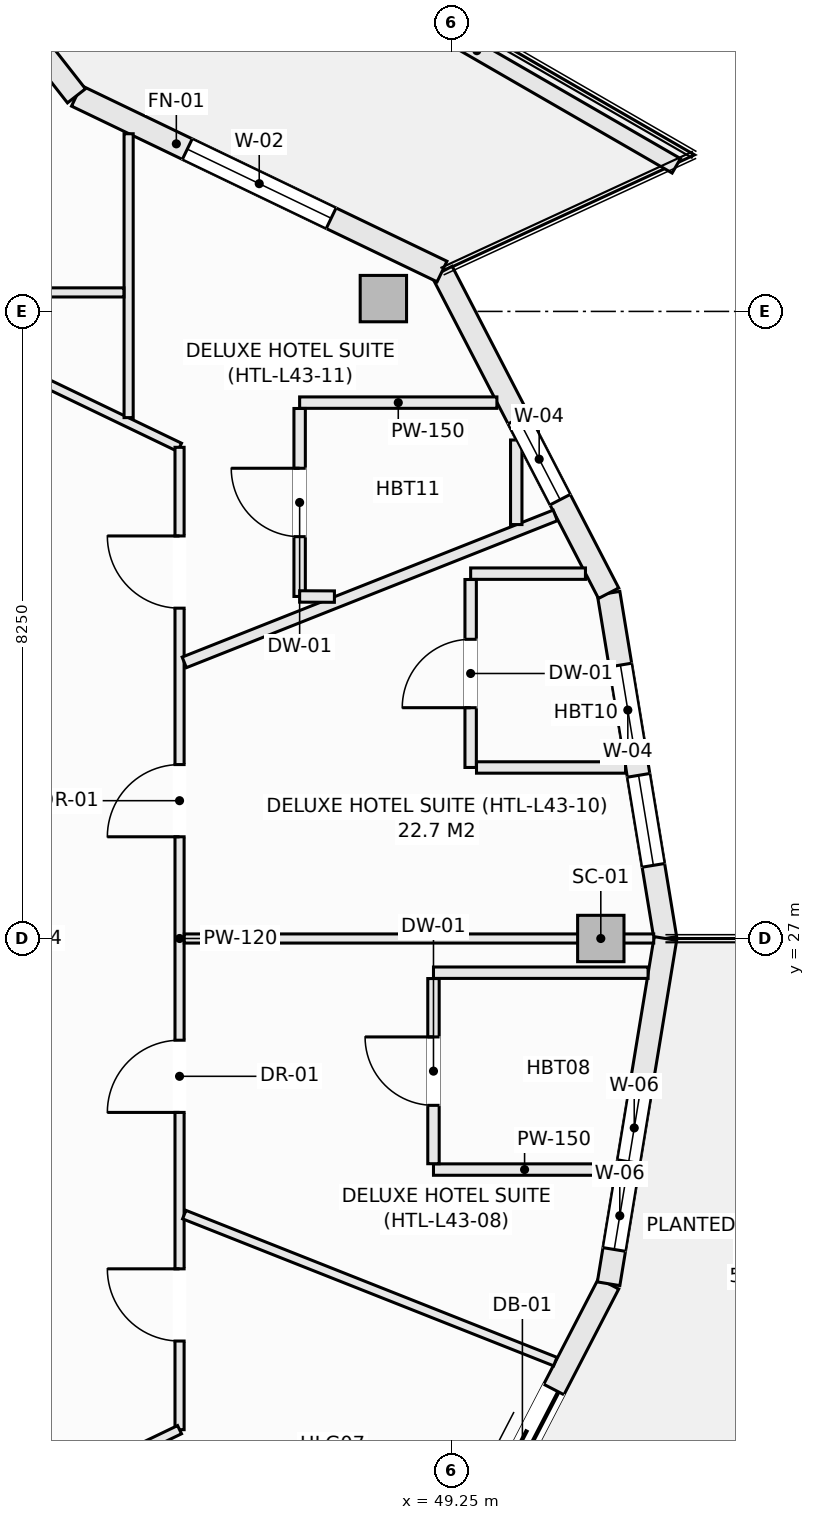
"""IFC4 building model, lengths in metres.
Left out: names, types, materials, properties, quantities, classifications, styles, units other than length and angle.
Written with IfcOpenShell. Run it as: python <this file> out.ifc"""

import sys

from ifc_helpers import new_model, si_unit, direction, frame, frame_2d, origin, origin_2d, place, context, subcontext, project, spatial, rectangle, hollow_rectangle, extrude, element, fill, save


model = new_model("IFC4")
c1 = context("Model", 3, precision=1e-05, world=origin(), true_north=direction((0.0, 1.0)))
c2 = subcontext(c1, "Body", "Model", "MODEL_VIEW")
j1 = project(units=[si_unit("LENGTHUNIT", "METRE"), si_unit("PLANEANGLEUNIT", "RADIAN")], contexts=[c1])
p1 = place(None, origin())
s1 = spatial("IfcSite", under=j1, at=p1, CompositionType="ELEMENT")
p2 = place(p1, origin())
s2 = spatial("IfcBuilding", under=s1, at=p2, CompositionType="ELEMENT")
p3 = place(p2, frame((0.0, 0.0, 166.5)))
s3 = spatial("IfcBuildingStorey", under=s2, at=p3, CompositionType="ELEMENT", Elevation=166.5)
for number, where, z_axis, x_axis in (
    (1, (51.212, 27.0, -0.27), (0.0, 0.0, 1.0), (1.0, 0.0, 0.0)),
    (2, (48.352, 35.419, -0.27), (0.0, 0.0, 1.0), (1.0, 0.0, 0.0)),
):
    element("IfcColumn", number, at=place(p3, frame(where, z_axis=z_axis, x_axis=x_axis)), inside=s3, PredefinedType="COLUMN", context=c2, shape_type="SweptSolid", body=[
        extrude(hollow_rectangle(XDim=0.61, YDim=0.61, WallThickness=0.025, at=origin_2d()), origin(), (0.0, 0.0, 1.0), 3.4),
    ])
p4 = place(p3, frame((51.315, 31.542, 0.0), z_axis=(0.0, 0.0, 1.0), x_axis=(0.162394765401, -0.986725868806, 0.0)))
e3 = element("IfcWall", 3, at=p4, inside=s3, PredefinedType="SOLIDWALL", context=c2, shape_type="SweptSolid", body=[
    extrude(rectangle(XDim=4.603, YDim=0.3, at=frame_2d((2.302, 0.0))), origin(), (0.0, 0.0, 1.0), 2.653),
])
p5 = place(p4, frame((0.958, 0.0, 0.74)))
e4 = element("IfcOpeningElement", 4, at=p5, cuts=e3, PredefinedType="OPENING", context=c2, shape_type="SweptSolid", body=[
    extrude(rectangle(XDim=1.2, YDim=1.7, at=frame_2d((0.6, 0.85))), frame((0.0, 0.16, 0.0), z_axis=(0.0, -1.0, 0.0), x_axis=(1.0, 0.0, 0.0)), (0.0, 0.0, 1.0), 0.32),
])
p6 = place(p4, frame((2.428, 0.0, 0.74)))
e5 = element("IfcOpeningElement", 5, at=p6, cuts=e3, PredefinedType="OPENING", context=c2, shape_type="SweptSolid", body=[
    extrude(rectangle(XDim=1.2, YDim=1.7, at=frame_2d((0.6, 0.85))), frame((0.0, 0.16, 0.0), z_axis=(0.0, -1.0, 0.0), x_axis=(1.0, 0.0, 0.0)), (0.0, 0.0, 1.0), 0.32),
])
p7 = place(p3, frame((49.123, 35.775, 0.0), z_axis=(0.0, 0.0, 1.0), x_axis=(0.459810251451, -0.888017191647, 0.0)))
e6 = element("IfcWall", 6, at=p7, inside=s3, PredefinedType="SOLIDWALL", context=c2, shape_type="SweptSolid", body=[
    extrude(rectangle(XDim=4.766, YDim=0.3, at=frame_2d((2.383, 0.0))), origin(), (0.0, 0.0, 1.0), 2.653),
])
p8 = place(p7, frame((2.18, 0.0, 0.72)))
e7 = element("IfcOpeningElement", 7, at=p8, cuts=e6, PredefinedType="OPENING", context=c2, shape_type="SweptSolid", body=[
    extrude(rectangle(XDim=1.2, YDim=1.65, at=frame_2d((0.6, 0.825))), frame((0.0, 0.16, 0.0), z_axis=(0.0, -1.0, 0.0), x_axis=(1.0, 0.0, 0.0)), (0.0, 0.0, 1.0), 0.32),
])
p9 = place(p3, frame((44.313, 38.086, 0.0), z_axis=(0.0, 0.0, 1.0), x_axis=(0.901353070301, -0.433085029363, 0.0)))
e8 = element("IfcWall", 8, at=p9, inside=s3, PredefinedType="SOLIDWALL", context=c2, shape_type="SweptSolid", body=[
    extrude(rectangle(XDim=5.336, YDim=0.3, at=frame_2d((2.668, 0.0))), origin(), (0.0, 0.0, 1.0), 2.653),
])
p10 = place(p9, frame((1.618, 0.0, 0.74)))
e9 = element("IfcOpeningElement", 9, at=p10, cuts=e8, PredefinedType="OPENING", context=c2, shape_type="SweptSolid", body=[
    extrude(rectangle(XDim=2.1, YDim=1.7, at=frame_2d((1.05, 0.85))), frame((0.0, 0.16, 0.0), z_axis=(0.0, -1.0, 0.0), x_axis=(1.0, 0.0, 0.0)), (0.0, 0.0, 1.0), 0.32),
])
p11 = place(p3, frame((41.094, 42.199, 0.0), z_axis=(0.0, 0.0, 1.0), x_axis=(0.616429245738, -0.787410302828, 0.0)))
e10 = element("IfcWall", 10, at=p11, inside=s3, PredefinedType="SOLIDWALL", context=c2, shape_type="SweptSolid", body=[
    extrude(rectangle(XDim=5.223, YDim=0.3, at=frame_2d((2.612, 0.0))), origin(), (0.0, 0.0, 1.0), 2.653),
])
p12 = place(p11, frame((1.712, 0.0, 0.0)))
e11 = element("IfcOpeningElement", 11, at=p12, cuts=e10, PredefinedType="OPENING", context=c2, shape_type="SweptSolid", body=[
    extrude(rectangle(XDim=1.8, YDim=2.25, at=frame_2d((0.9, 1.125))), frame((0.0, 0.16, 0.0), z_axis=(0.0, -1.0, 0.0), x_axis=(1.0, 0.0, 0.0)), (0.0, 0.0, 1.0), 0.32),
])
p13 = place(p3, frame((49.123, 18.225, 0.0), z_axis=(0.0, 0.0, 1.0), x_axis=(0.459810251451, 0.888017191647, 0.0)))
e12 = element("IfcWall", 12, at=p13, inside=s3, PredefinedType="SOLIDWALL", context=c2, shape_type="SweptSolid", body=[
    extrude(rectangle(XDim=4.766, YDim=0.3, at=frame_2d((2.383, 0.0))), origin(), (0.0, 0.0, 1.0), 2.653),
])
p14 = place(p13, frame((1.4, 0.0, 0.0)))
e13 = element("IfcOpeningElement", 13, at=p14, cuts=e12, PredefinedType="OPENING", context=c2, shape_type="SweptSolid", body=[
    extrude(rectangle(XDim=1.8, YDim=2.25, at=frame_2d((0.9, 1.125))), frame((0.0, 0.16, 0.0), z_axis=(0.0, -1.0, 0.0), x_axis=(1.0, 0.0, 0.0)), (0.0, 0.0, 1.0), 0.32),
])
p15 = place(p3, frame((51.315, 22.458, 0.0), z_axis=(0.0, 0.0, 1.0), x_axis=(0.162394765401, 0.986725868806, 0.0)))
e14 = element("IfcWall", 14, at=p15, inside=s3, PredefinedType="SOLIDWALL", context=c2, shape_type="SweptSolid", body=[
    extrude(rectangle(XDim=4.603, YDim=0.3, at=frame_2d((2.302, 0.0))), origin(), (0.0, 0.0, 1.0), 2.653),
])
p16 = place(p15, frame((0.457, 0.0, 0.72)))
e15 = element("IfcOpeningElement", 15, at=p16, cuts=e14, PredefinedType="OPENING", context=c2, shape_type="SweptSolid", body=[
    extrude(rectangle(XDim=0.9, YDim=1.65, at=frame_2d((0.45, 0.825))), frame((0.0, 0.16, 0.0), z_axis=(0.0, -1.0, 0.0), x_axis=(1.0, 0.0, 0.0)), (0.0, 0.0, 1.0), 0.32),
])
p17 = place(p15, frame((1.627, 0.0, 0.72)))
e16 = element("IfcOpeningElement", 16, at=p17, cuts=e14, PredefinedType="OPENING", context=c2, shape_type="SweptSolid", body=[
    extrude(rectangle(XDim=0.9, YDim=1.65, at=frame_2d((0.45, 0.825))), frame((0.0, 0.16, 0.0), z_axis=(0.0, -1.0, 0.0), x_axis=(1.0, 0.0, 0.0)), (0.0, 0.0, 1.0), 0.32),
])
p18 = place(p3, frame((46.958, 40.195, 0.0), z_axis=(0.0, 0.0, 1.0), x_axis=(0.866058128659, -0.499943314571, 0.0)))
e17 = element("IfcWall", 17, at=p18, inside=s3, PredefinedType="PARAPET", context=c2, shape_type="SweptSolid", body=[
    extrude(rectangle(XDim=6.06, YDim=0.22, at=frame_2d((3.03, 0.0))), origin(), (0.0, 0.0, 1.0), 0.52),
])
p19 = place(p3, frame((52.18, 16.779, 0.0), z_axis=(0.0, 0.0, 1.0), x_axis=(0.439637174641, 0.898175458735, 0.0)))
e18 = element("IfcWall", 18, at=p19, inside=s3, PredefinedType="PARAPET", context=c2, shape_type="SweptSolid", body=[
    extrude(rectangle(XDim=5.567, YDim=0.22, at=frame_2d((2.784, 0.0))), origin(), (0.0, 0.0, 1.0), 0.52),
])
p20 = place(p3, frame((49.011, 23.96, 0.0), z_axis=(0.0, 0.0, 1.0), x_axis=(1.0, 0.0, 0.0)))
e19 = element("IfcWall", 19, at=p20, inside=s3, PredefinedType="PARTITIONING", context=c2, shape_type="SweptSolid", body=[
    extrude(rectangle(XDim=2.397, YDim=0.15, at=frame_2d((1.199, 0.0))), origin(), (0.0, 0.0, 1.0), 3.13),
])
p21 = place(p3, frame((43.812, 34.355, 0.0), z_axis=(0.0, 0.0, 1.0), x_axis=(0.901236415331, -0.433327732417, 0.0)))
e20 = element("IfcWall", 20, at=p21, inside=s3, PredefinedType="PARTITIONING", context=c2, shape_type="SweptSolid", body=[
    extrude(rectangle(XDim=2.062, YDim=0.12, at=frame_2d((1.031, 0.0))), origin(), (0.0, 0.0, 1.0), 3.13),
])
p22 = place(p3, frame((45.67, 20.538, 0.0), z_axis=(0.0, 0.0, 1.0), x_axis=(0.0, 1.0, 0.0)))
e21 = element("IfcWall", 21, at=p22, inside=s3, PredefinedType="PARTITIONING", context=c2, shape_type="SweptSolid", body=[
    extrude(rectangle(XDim=12.924, YDim=0.12, at=frame_2d((6.462, 0.0))), origin(), (0.0, 0.0, 1.0), 3.13),
])
p23 = place(p22, frame((1.166, 0.0, 0.0)))
e22 = element("IfcOpeningElement", 22, at=p23, cuts=e21, PredefinedType="OPENING", context=c2, shape_type="SweptSolid", body=[
    extrude(rectangle(XDim=0.95, YDim=2.1, at=frame_2d((0.475, 1.05))), frame((0.0, 0.07, 0.0), z_axis=(0.0, -1.0, 0.0), x_axis=(1.0, 0.0, 0.0)), (0.0, 0.0, 1.0), 0.14),
])
p24 = place(p22, frame((4.174, 0.0, 0.0)))
e23 = element("IfcOpeningElement", 23, at=p24, cuts=e21, PredefinedType="OPENING", context=c2, shape_type="SweptSolid", body=[
    extrude(rectangle(XDim=0.95, YDim=2.1, at=frame_2d((0.475, 1.05))), frame((0.0, 0.07, 0.0), z_axis=(0.0, -1.0, 0.0), x_axis=(1.0, 0.0, 0.0)), (0.0, 0.0, 1.0), 0.14),
])
p25 = place(p22, frame((7.8, 0.0, 0.0)))
e24 = element("IfcOpeningElement", 24, at=p25, cuts=e21, PredefinedType="OPENING", context=c2, shape_type="SweptSolid", body=[
    extrude(rectangle(XDim=0.95, YDim=2.1, at=frame_2d((0.475, 1.05))), frame((0.0, 0.07, 0.0), z_axis=(0.0, -1.0, 0.0), x_axis=(1.0, 0.0, 0.0)), (0.0, 0.0, 1.0), 0.14),
])
p26 = place(p22, frame((10.808, 0.0, 0.0)))
e25 = element("IfcOpeningElement", 25, at=p26, cuts=e21, PredefinedType="OPENING", context=c2, shape_type="SweptSolid", body=[
    extrude(rectangle(XDim=0.95, YDim=2.1, at=frame_2d((0.475, 1.05))), frame((0.0, 0.07, 0.0), z_axis=(0.0, -1.0, 0.0), x_axis=(1.0, 0.0, 0.0)), (0.0, 0.0, 1.0), 0.14),
])
p27 = place(p3, frame((43.812, 19.645, 0.0), z_axis=(0.0, 0.0, 1.0), x_axis=(0.901236415331, 0.433327732417, 0.0)))
e26 = element("IfcWall", 26, at=p27, inside=s3, PredefinedType="PARTITIONING", context=c2, shape_type="SweptSolid", body=[
    extrude(rectangle(XDim=2.062, YDim=0.12, at=frame_2d((1.031, 0.0))), origin(), (0.0, 0.0, 1.0), 3.13),
])
p28 = place(p3, frame((45.732, 27.0, 0.0), z_axis=(0.0, 0.0, 1.0), x_axis=(1.0, 0.0, 0.0)))
e27 = element("IfcWall", 27, at=p28, inside=s3, PredefinedType="PARTITIONING", context=c2, shape_type="SweptSolid", body=[
    extrude(rectangle(XDim=6.177, YDim=0.12, at=frame_2d((3.088, 0.0))), origin(), (0.0, 0.0, 1.0), 2.505),
])
p29 = place(p3, frame((45.0, 33.853, 0.0), z_axis=(0.0, 0.0, 1.0), x_axis=(0.0, 1.0, 0.0)))
e28 = element("IfcWall", 28, at=p29, inside=s3, PredefinedType="PARTITIONING", context=c2, shape_type="SweptSolid", body=[
    extrude(rectangle(XDim=3.735, YDim=0.12, at=frame_2d((1.867, 0.0))), origin(), (0.0, 0.0, 1.0), 3.13),
])
p30 = place(p3, frame((45.732, 23.367, 0.0), z_axis=(0.0, 0.0, 1.0), x_axis=(0.929706134606, -0.368302190158, 0.0)))
e29 = element("IfcWall", 29, at=p30, inside=s3, PredefinedType="PARTITIONING", context=c2, shape_type="SweptSolid", body=[
    extrude(rectangle(XDim=5.251, YDim=0.12, at=frame_2d((2.625, 0.0))), origin(), (0.0, 0.0, 1.0), 3.13),
])
p31 = place(p3, frame((49.011, 26.55, 0.0), z_axis=(0.0, 0.0, 1.0), x_axis=(1.0, 0.0, 0.0)))
e30 = element("IfcWall", 30, at=p31, inside=s3, PredefinedType="PARTITIONING", context=c2, shape_type="SweptSolid", body=[
    extrude(rectangle(XDim=2.823, YDim=0.15, at=frame_2d((1.412, 0.0))), origin(), (0.0, 0.0, 1.0), 3.13),
])
p32 = place(p3, frame((49.011, 24.037, 0.0), z_axis=(0.0, 0.0, 1.0), x_axis=(0.0, 1.0, 0.0)))
e31 = element("IfcWall", 31, at=p32, inside=s3, PredefinedType="PARTITIONING", context=c2, shape_type="SweptSolid", body=[
    extrude(rectangle(XDim=2.436, YDim=0.15, at=frame_2d((1.218, 0.0))), origin(), (0.0, 0.0, 1.0), 3.13),
])
p33 = place(p32, frame((0.768, 0.0, 0.0)))
e32 = element("IfcOpeningElement", 32, at=p33, cuts=e31, PredefinedType="OPENING", context=c2, shape_type="SweptSolid", body=[
    extrude(rectangle(XDim=0.9, YDim=2.1, at=frame_2d((0.45, 1.05))), frame((0.0, 0.085, 0.0), z_axis=(0.0, -1.0, 0.0), x_axis=(1.0, 0.0, 0.0)), (0.0, 0.0, 1.0), 0.17),
])
p34 = place(p3, frame((49.5, 31.8, 0.0), z_axis=(0.0, 0.0, 1.0), x_axis=(1.0, 0.0, 0.0)))
e33 = element("IfcWall", 33, at=p34, inside=s3, PredefinedType="PARTITIONING", context=c2, shape_type="SweptSolid", body=[
    extrude(rectangle(XDim=1.51, YDim=0.15, at=frame_2d((0.755, 0.0))), origin(), (0.0, 0.0, 1.0), 3.13),
])
p35 = place(p3, frame((49.5, 29.25, 0.0), z_axis=(0.0, 0.0, 1.0), x_axis=(0.0, 1.0, 0.0)))
e34 = element("IfcWall", 34, at=p35, inside=s3, PredefinedType="PARTITIONING", context=c2, shape_type="SweptSolid", body=[
    extrude(rectangle(XDim=2.473, YDim=0.15, at=frame_2d((1.236, 0.0))), origin(), (0.0, 0.0, 1.0), 2.653),
])
p36 = place(p35, frame((0.787, 0.0, 0.0)))
e35 = element("IfcOpeningElement", 35, at=p36, cuts=e34, PredefinedType="OPENING", context=c2, shape_type="SweptSolid", body=[
    extrude(rectangle(XDim=0.9, YDim=2.1, at=frame_2d((0.45, 1.05))), frame((0.0, 0.085, 0.0), z_axis=(0.0, -1.0, 0.0), x_axis=(1.0, 0.0, 0.0)), (0.0, 0.0, 1.0), 0.17),
])
p37 = place(p3, frame((49.577, 29.25, 0.0), z_axis=(0.0, 0.0, 1.0), x_axis=(1.0, 0.0, 0.0)))
e36 = element("IfcWall", 36, at=p37, inside=s3, PredefinedType="PARTITIONING", context=c2, shape_type="SweptSolid", body=[
    extrude(rectangle(XDim=1.961, YDim=0.15, at=frame_2d((0.98, 0.0))), origin(), (0.0, 0.0, 1.0), 3.13),
])
p38 = place(p3, frame((45.732, 30.633, 0.0), z_axis=(0.0, 0.0, 1.0), x_axis=(0.929706134606, 0.368302190158, 0.0)))
e37 = element("IfcWall", 37, at=p38, inside=s3, PredefinedType="PARTITIONING", context=c2, shape_type="SweptSolid", body=[
    extrude(rectangle(XDim=5.251, YDim=0.15, at=frame_2d((2.625, 0.0))), origin(), (0.0, 0.0, 1.0), 3.13),
])
p39 = place(p3, frame((47.25, 34.05, 0.0), z_axis=(0.0, 0.0, 1.0), x_axis=(1.0, 0.0, 0.0)))
e38 = element("IfcWall", 38, at=p39, inside=s3, PredefinedType="PARTITIONING", context=c2, shape_type="SweptSolid", body=[
    extrude(rectangle(XDim=2.595, YDim=0.15, at=frame_2d((1.298, 0.0))), origin(), (0.0, 0.0, 1.0), 3.13),
])
p40 = place(p3, frame((47.25, 31.5, 0.0), z_axis=(0.0, 0.0, 1.0), x_axis=(0.0, 1.0, 0.0)))
e39 = element("IfcWall", 39, at=p40, inside=s3, PredefinedType="PARTITIONING", context=c2, shape_type="SweptSolid", body=[
    extrude(rectangle(XDim=2.473, YDim=0.15, at=frame_2d((1.236, 0.0))), origin(), (0.0, 0.0, 1.0), 3.13),
])
p41 = place(p40, frame((0.787, 0.0, 0.0)))
e40 = element("IfcOpeningElement", 40, at=p41, cuts=e39, PredefinedType="OPENING", context=c2, shape_type="SweptSolid", body=[
    extrude(rectangle(XDim=0.9, YDim=2.1, at=frame_2d((0.45, 1.05))), frame((0.0, 0.085, 0.0), z_axis=(0.0, -1.0, 0.0), x_axis=(1.0, 0.0, 0.0)), (0.0, 0.0, 1.0), 0.17),
])
p42 = place(p3, frame((47.25, 31.5, 0.0), z_axis=(0.0, 0.0, 1.0), x_axis=(0.999990888186, -0.004268904539, 0.0)))
e41 = element("IfcWall", 41, at=p42, inside=s3, PredefinedType="PARTITIONING", context=c2, shape_type="SweptSolid", body=[
    extrude(rectangle(XDim=0.458, YDim=0.15, at=frame_2d((0.229, 0.0))), origin(), (0.0, 0.0, 1.0), 3.13),
])
p43 = place(p3, frame((50.1, 32.446, 0.0), z_axis=(0.0, 0.0, 1.0), x_axis=(0.0, 1.0, 0.0)))
e42 = element("IfcWall", 42, at=p43, inside=s3, PredefinedType="PARTITIONING", context=c2, shape_type="SweptSolid", body=[
    extrude(rectangle(XDim=1.113, YDim=0.15, at=frame_2d((0.556, 0.0))), origin(), (0.0, 0.0, 1.0), 3.13),
])
p44 = place(p3, frame((39.082, 35.5, 0.0), z_axis=(0.0, 0.0, 1.0), x_axis=(1.0, 0.0, 0.0)))
e43 = element("IfcWall", 43, at=p44, inside=s3, PredefinedType="PARTITIONING", context=c2, shape_type="SweptSolid", body=[
    extrude(rectangle(XDim=5.856, YDim=0.12, at=frame_2d((2.928, 0.0))), origin(), (0.0, 0.0, 1.0), 2.812),
])
p45 = place(p5, origin())
e44 = element("IfcWindow", 44, at=p45, inside=s3, PartitioningType="SINGLE_PANEL", PredefinedType="WINDOW", context=c2, shape_type="SweptSolid", body=[
    extrude(rectangle(XDim=1.2, YDim=1.7, at=frame_2d((0.6, 0.85))), frame((0.0, 0.03, 0.0), z_axis=(0.0, -1.0, 0.0), x_axis=(1.0, 0.0, 0.0)), (0.0, 0.0, 1.0), 0.06),
])
fill(e4, e44)
p46 = place(p8, origin())
e45 = element("IfcWindow", 45, at=p46, inside=s3, PartitioningType="SINGLE_PANEL", PredefinedType="WINDOW", context=c2, shape_type="SweptSolid", body=[
    extrude(rectangle(XDim=1.2, YDim=1.65, at=frame_2d((0.6, 0.825))), frame((0.0, 0.03, 0.0), z_axis=(0.0, -1.0, 0.0), x_axis=(1.0, 0.0, 0.0)), (0.0, 0.0, 1.0), 0.06),
])
fill(e7, e45)
p47 = place(p10, origin())
e46 = element("IfcWindow", 46, at=p47, inside=s3, PartitioningType="SINGLE_PANEL", PredefinedType="WINDOW", context=c2, shape_type="SweptSolid", body=[
    extrude(rectangle(XDim=2.1, YDim=1.7, at=frame_2d((1.05, 0.85))), frame((0.0, 0.03, 0.0), z_axis=(0.0, -1.0, 0.0), x_axis=(1.0, 0.0, 0.0)), (0.0, 0.0, 1.0), 0.06),
])
fill(e9, e46)
p48 = place(p14, frame((1.8, 0.0, 0.0), z_axis=(0.0, 0.0, 1.0), x_axis=(-1.0, 0.0, 0.0)))
e47 = element("IfcDoor", 47, at=p48, inside=s3, OperationType="SLIDING_TO_LEFT", PredefinedType="DOOR", context=c2, shape_type="SweptSolid", body=[
    extrude(rectangle(XDim=1.8, YDim=2.25, at=frame_2d((0.9, 1.125))), frame((0.0, 0.025, 0.0), z_axis=(0.0, -1.0, 0.0), x_axis=(1.0, 0.0, 0.0)), (0.0, 0.0, 1.0), 0.05),
])
fill(e13, e47)
p49 = place(p16, origin())
e48 = element("IfcWindow", 48, at=p49, inside=s3, PartitioningType="SINGLE_PANEL", PredefinedType="WINDOW", context=c2, shape_type="SweptSolid", body=[
    extrude(rectangle(XDim=0.9, YDim=1.65, at=frame_2d((0.45, 0.825))), frame((0.0, 0.03, 0.0), z_axis=(0.0, -1.0, 0.0), x_axis=(1.0, 0.0, 0.0)), (0.0, 0.0, 1.0), 0.06),
])
fill(e15, e48)
p50 = place(p23, origin())
e49 = element("IfcDoor", 49, at=p50, inside=s3, OperationType="SINGLE_SWING_RIGHT", PredefinedType="DOOR", context=c2, shape_type="SweptSolid", body=[
    extrude(rectangle(XDim=0.95, YDim=2.1, at=frame_2d((0.475, 1.05))), frame((0.0, 0.025, 0.0), z_axis=(0.0, -1.0, 0.0), x_axis=(1.0, 0.0, 0.0)), (0.0, 0.0, 1.0), 0.05),
])
fill(e22, e49)
p51 = place(p24, origin())
e50 = element("IfcDoor", 50, at=p51, inside=s3, OperationType="SINGLE_SWING_LEFT", PredefinedType="DOOR", context=c2, shape_type="SweptSolid", body=[
    extrude(rectangle(XDim=0.95, YDim=2.1, at=frame_2d((0.475, 1.05))), frame((0.0, 0.025, 0.0), z_axis=(0.0, -1.0, 0.0), x_axis=(1.0, 0.0, 0.0)), (0.0, 0.0, 1.0), 0.05),
])
fill(e23, e50)
p52 = place(p25, origin())
e51 = element("IfcDoor", 51, at=p52, inside=s3, OperationType="SINGLE_SWING_LEFT", PredefinedType="DOOR", context=c2, shape_type="SweptSolid", body=[
    extrude(rectangle(XDim=0.95, YDim=2.1, at=frame_2d((0.475, 1.05))), frame((0.0, 0.025, 0.0), z_axis=(0.0, -1.0, 0.0), x_axis=(1.0, 0.0, 0.0)), (0.0, 0.0, 1.0), 0.05),
])
fill(e24, e51)
p53 = place(p26, origin())
e52 = element("IfcDoor", 52, at=p53, inside=s3, OperationType="SINGLE_SWING_RIGHT", PredefinedType="DOOR", context=c2, shape_type="SweptSolid", body=[
    extrude(rectangle(XDim=0.95, YDim=2.1, at=frame_2d((0.475, 1.05))), frame((0.0, 0.025, 0.0), z_axis=(0.0, -1.0, 0.0), x_axis=(1.0, 0.0, 0.0)), (0.0, 0.0, 1.0), 0.05),
])
fill(e25, e52)
p54 = place(p33, origin())
e53 = element("IfcDoor", 53, at=p54, inside=s3, OperationType="SINGLE_SWING_RIGHT", PredefinedType="DOOR", context=c2, shape_type="SweptSolid", body=[
    extrude(rectangle(XDim=0.9, YDim=2.1, at=frame_2d((0.45, 1.05))), frame((0.0, 0.025, 0.0), z_axis=(0.0, -1.0, 0.0), x_axis=(1.0, 0.0, 0.0)), (0.0, 0.0, 1.0), 0.05),
])
fill(e32, e53)
p55 = place(p36, origin())
e54 = element("IfcDoor", 54, at=p55, inside=s3, OperationType="SINGLE_SWING_LEFT", PredefinedType="DOOR", context=c2, shape_type="SweptSolid", body=[
    extrude(rectangle(XDim=0.9, YDim=2.1, at=frame_2d((0.45, 1.05))), frame((0.0, 0.025, 0.0), z_axis=(0.0, -1.0, 0.0), x_axis=(1.0, 0.0, 0.0)), (0.0, 0.0, 1.0), 0.05),
])
fill(e35, e54)
p56 = place(p41, origin())
e55 = element("IfcDoor", 55, at=p56, inside=s3, OperationType="SINGLE_SWING_RIGHT", PredefinedType="DOOR", context=c2, shape_type="SweptSolid", body=[
    extrude(rectangle(XDim=0.9, YDim=2.1, at=frame_2d((0.45, 1.05))), frame((0.0, 0.025, 0.0), z_axis=(0.0, -1.0, 0.0), x_axis=(1.0, 0.0, 0.0)), (0.0, 0.0, 1.0), 0.05),
])
fill(e40, e55)
p57 = place(p6, origin())
e56 = element("IfcWindow", 56, at=p57, inside=s3, PartitioningType="SINGLE_PANEL", PredefinedType="WINDOW", context=c2, shape_type="SweptSolid", body=[
    extrude(rectangle(XDim=1.2, YDim=1.7, at=frame_2d((0.6, 0.85))), frame((0.0, 0.03, 0.0), z_axis=(0.0, -1.0, 0.0), x_axis=(1.0, 0.0, 0.0)), (0.0, 0.0, 1.0), 0.06),
])
fill(e5, e56)
p58 = place(p17, origin())
e57 = element("IfcWindow", 57, at=p58, inside=s3, PartitioningType="SINGLE_PANEL", PredefinedType="WINDOW", context=c2, shape_type="SweptSolid", body=[
    extrude(rectangle(XDim=0.9, YDim=1.65, at=frame_2d((0.45, 0.825))), frame((0.0, 0.03, 0.0), z_axis=(0.0, -1.0, 0.0), x_axis=(1.0, 0.0, 0.0)), (0.0, 0.0, 1.0), 0.06),
])
fill(e16, e57)
save(model, sys.argv[1])
